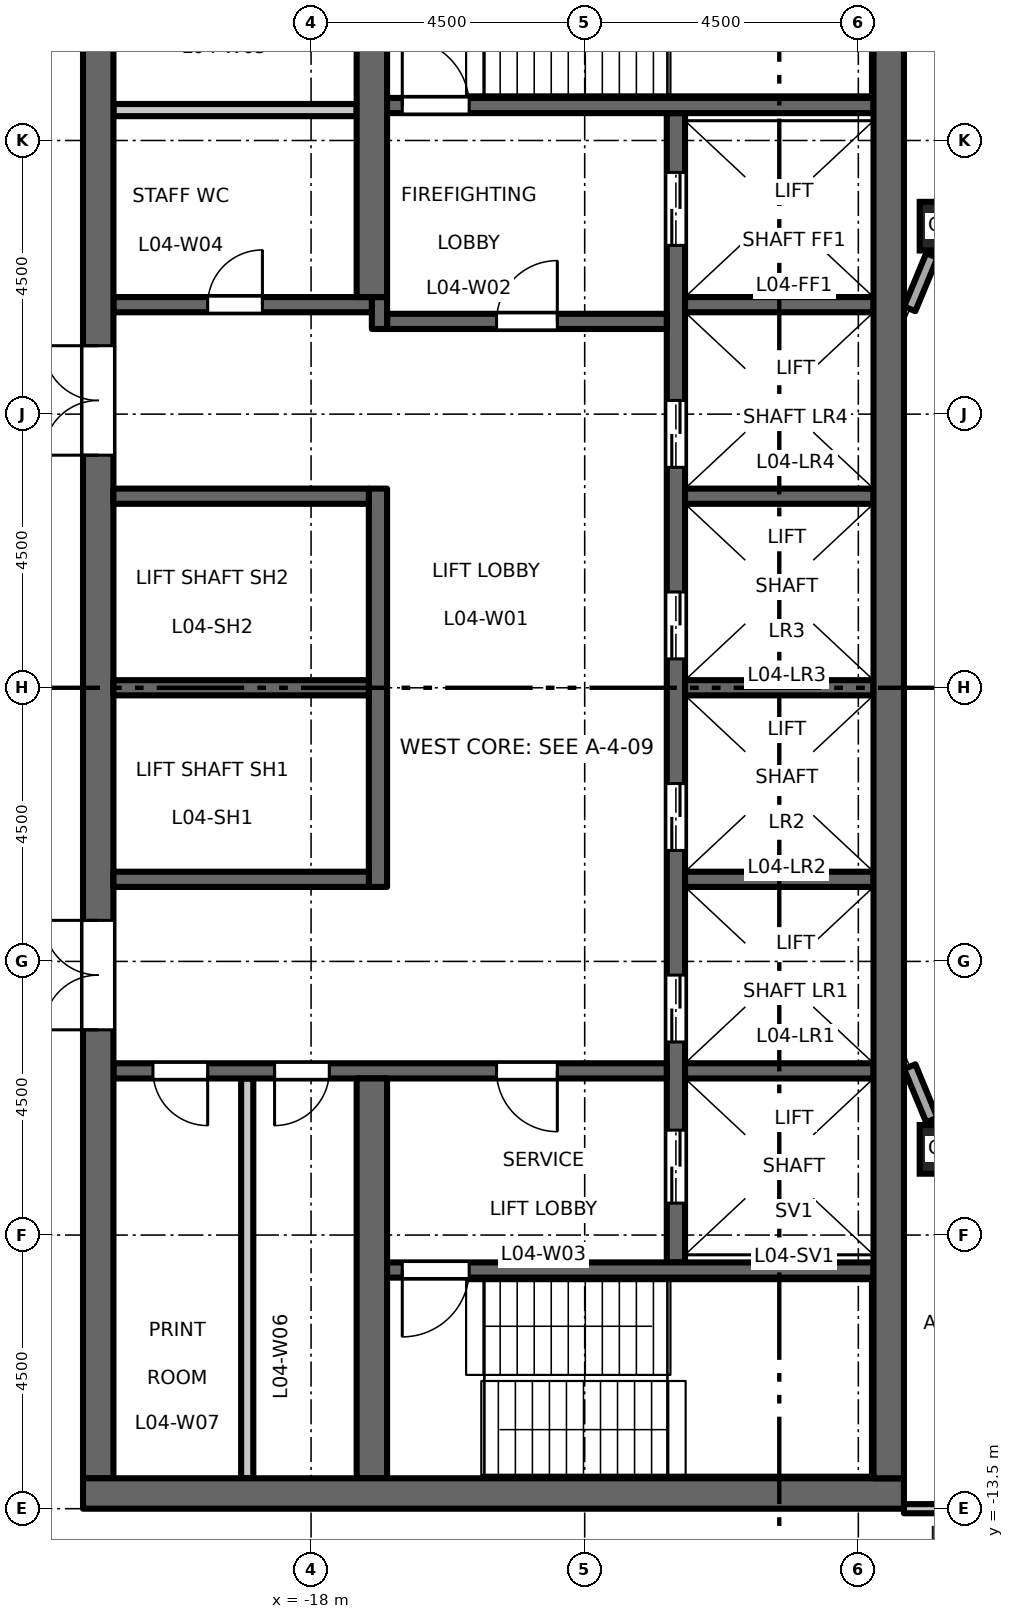
"""IFC4 building model, lengths in metres.
Left out: names, types, materials, properties, quantities, classifications, styles, units other than length and angle.
Written with IfcOpenShell. Run it as: python <this file> out.ifc"""

import sys

from ifc_helpers import new_model, si_unit, direction, frame, frame_2d, origin, origin_2d, place, context, subcontext, project, spatial, rectangle, hollow_rectangle, extrude, element, fill, save


model = new_model("IFC4")
c1 = context("Model", 3, precision=1e-05, world=origin(), true_north=direction((0.0, 1.0)))
c2 = subcontext(c1, "Body", "Model", "MODEL_VIEW")
j1 = project(units=[si_unit("LENGTHUNIT", "METRE"), si_unit("PLANEANGLEUNIT", "RADIAN")], contexts=[c1])
p1 = place(None, origin())
s1 = spatial("IfcSite", under=j1, at=p1, CompositionType="ELEMENT")
p2 = place(p1, origin())
s2 = spatial("IfcBuilding", under=s1, at=p2, CompositionType="ELEMENT")
p3 = place(p2, frame((0.0, 0.0, 22.2)))
s3 = spatial("IfcBuildingStorey", under=s2, at=p3, CompositionType="ELEMENT", Elevation=22.2)
for number, where, z_axis, x_axis in (
    (1, (-7.591, -7.591, 0.0), (0.0, 0.0, 1.0), (1.0, 0.0, 0.0)),
    (2, (-7.591, 7.591, 0.0), (0.0, 0.0, 1.0), (1.0, 0.0, 0.0)),
):
    element("IfcColumn", number, at=place(p3, frame(where, z_axis=z_axis, x_axis=x_axis)), inside=s3, PredefinedType="COLUMN", context=c2, shape_type="SweptSolid", body=[
        extrude(hollow_rectangle(XDim=0.8, YDim=0.8, WallThickness=0.05, at=origin_2d()), origin(), (0.0, 0.0, 1.0), 4.5),
    ])
p4 = place(p3, frame((-12.0, -9.45, 0.0), z_axis=(0.0, 0.0, 1.0), x_axis=(0.0, 1.0, 0.0)))
e3 = element("IfcWall", 3, at=p4, inside=s3, PredefinedType="SHEAR", context=c2, shape_type="SweptSolid", body=[
    extrude(rectangle(XDim=18.9, YDim=0.3, at=frame_2d((9.45, 0.0))), origin(), (0.0, 0.0, 1.0), 4.35),
])
p5 = place(p4, frame((3.625, 0.0, 0.0)))
e4 = element("IfcOpeningElement", 4, at=p5, cuts=e3, PredefinedType="OPENING", context=c2, shape_type="SweptSolid", body=[
    extrude(rectangle(XDim=1.1, YDim=2.1, at=frame_2d((0.55, 1.05))), frame((0.0, 0.16, 0.0), z_axis=(0.0, -1.0, 0.0), x_axis=(1.0, 0.0, 0.0)), (0.0, 0.0, 1.0), 0.32),
])
p6 = place(p4, frame((6.775, 0.0, 0.0)))
e5 = element("IfcOpeningElement", 5, at=p6, cuts=e3, PredefinedType="OPENING", context=c2, shape_type="SweptSolid", body=[
    extrude(rectangle(XDim=1.1, YDim=2.1, at=frame_2d((0.55, 1.05))), frame((0.0, 0.16, 0.0), z_axis=(0.0, -1.0, 0.0), x_axis=(1.0, 0.0, 0.0)), (0.0, 0.0, 1.0), 0.32),
])
p7 = place(p4, frame((9.925, 0.0, 0.0)))
e6 = element("IfcOpeningElement", 6, at=p7, cuts=e3, PredefinedType="OPENING", context=c2, shape_type="SweptSolid", body=[
    extrude(rectangle(XDim=1.1, YDim=2.1, at=frame_2d((0.55, 1.05))), frame((0.0, 0.16, 0.0), z_axis=(0.0, -1.0, 0.0), x_axis=(1.0, 0.0, 0.0)), (0.0, 0.0, 1.0), 0.32),
])
p8 = place(p4, frame((13.075, 0.0, 0.0)))
e7 = element("IfcOpeningElement", 7, at=p8, cuts=e3, PredefinedType="OPENING", context=c2, shape_type="SweptSolid", body=[
    extrude(rectangle(XDim=1.1, YDim=2.1, at=frame_2d((0.55, 1.05))), frame((0.0, 0.16, 0.0), z_axis=(0.0, -1.0, 0.0), x_axis=(1.0, 0.0, 0.0)), (0.0, 0.0, 1.0), 0.32),
])
p9 = place(p4, frame((16.725, 0.0, 0.0)))
e8 = element("IfcOpeningElement", 8, at=p9, cuts=e3, PredefinedType="OPENING", context=c2, shape_type="SweptSolid", body=[
    extrude(rectangle(XDim=1.2, YDim=2.1, at=frame_2d((0.6, 1.05))), frame((0.0, 0.16, 0.0), z_axis=(0.0, -1.0, 0.0), x_axis=(1.0, 0.0, 0.0)), (0.0, 0.0, 1.0), 0.32),
])
p10 = place(p4, frame((0.975, 0.0, 0.0)))
e9 = element("IfcOpeningElement", 9, at=p10, cuts=e3, PredefinedType="OPENING", context=c2, shape_type="SweptSolid", body=[
    extrude(rectangle(XDim=1.2, YDim=2.1, at=frame_2d((0.6, 1.05))), frame((0.0, 0.16, 0.0), z_axis=(0.0, -1.0, 0.0), x_axis=(1.0, 0.0, 0.0)), (0.0, 0.0, 1.0), 0.32),
])
p11 = place(p3, frame((-12.15, 6.025, 0.0), z_axis=(0.0, 0.0, 1.0), x_axis=(-1.0, 0.0, 0.0)))
e10 = element("IfcWall", 10, at=p11, inside=s3, PredefinedType="SHEAR", context=c2, shape_type="SweptSolid", body=[
    extrude(rectangle(XDim=4.6, YDim=0.25, at=frame_2d((2.3, 0.0))), origin(), (0.0, 0.0, 1.0), 4.35),
])
p12 = place(p11, frame((1.8, 0.0, 0.0)))
e11 = element("IfcOpeningElement", 11, at=p12, cuts=e10, PredefinedType="OPENING", context=c2, shape_type="SweptSolid", body=[
    extrude(rectangle(XDim=1.0, YDim=2.1, at=frame_2d((0.5, 1.05))), frame((0.0, 0.135, 0.0), z_axis=(0.0, -1.0, 0.0), x_axis=(1.0, 0.0, 0.0)), (0.0, 0.0, 1.0), 0.27),
])
p13 = place(p3, frame((-16.875, 5.9, 0.0), z_axis=(0.0, 0.0, 1.0), x_axis=(0.0, 1.0, 0.0)))
e12 = element("IfcWall", 12, at=p13, inside=s3, PredefinedType="SHEAR", context=c2, shape_type="SweptSolid", body=[
    extrude(rectangle(XDim=0.525, YDim=0.25, at=frame_2d((0.263, 0.0))), origin(), (0.0, 0.0, 1.0), 4.35),
])
p14 = place(p3, frame((-17.0, 6.3, 0.0), z_axis=(0.0, 0.0, 1.0), x_axis=(-1.0, 0.0, 0.0)))
e13 = element("IfcWall", 13, at=p14, inside=s3, PredefinedType="SHEAR", context=c2, shape_type="SweptSolid", body=[
    extrude(rectangle(XDim=4.25, YDim=0.25, at=frame_2d((2.125, 0.0))), origin(), (0.0, 0.0, 1.0), 4.35),
])
p15 = place(p14, frame((1.8, 0.0, 0.0)))
e14 = element("IfcOpeningElement", 14, at=p15, cuts=e13, PredefinedType="OPENING", context=c2, shape_type="SweptSolid", body=[
    extrude(rectangle(XDim=0.9, YDim=2.1, at=frame_2d((0.45, 1.05))), frame((0.0, 0.135, 0.0), z_axis=(0.0, -1.0, 0.0), x_axis=(1.0, 0.0, 0.0)), (0.0, 0.0, 1.0), 0.27),
])
p16 = place(p3, frame((-12.15, -6.3, 0.0), z_axis=(0.0, 0.0, 1.0), x_axis=(-1.0, 0.0, 0.0)))
e15 = element("IfcWall", 15, at=p16, inside=s3, PredefinedType="SHEAR", context=c2, shape_type="SweptSolid", body=[
    extrude(rectangle(XDim=9.1, YDim=0.25, at=frame_2d((4.55, 0.0))), origin(), (0.0, 0.0, 1.0), 4.35),
])
p17 = place(p16, frame((1.8, 0.0, 0.0)))
e16 = element("IfcOpeningElement", 16, at=p17, cuts=e15, PredefinedType="OPENING", context=c2, shape_type="SweptSolid", body=[
    extrude(rectangle(XDim=1.0, YDim=2.1, at=frame_2d((0.5, 1.05))), frame((0.0, 0.135, 0.0), z_axis=(0.0, -1.0, 0.0), x_axis=(1.0, 0.0, 0.0)), (0.0, 0.0, 1.0), 0.27),
])
p18 = place(p16, frame((5.55, 0.0, 0.0)))
e17 = element("IfcOpeningElement", 17, at=p18, cuts=e15, PredefinedType="OPENING", context=c2, shape_type="SweptSolid", body=[
    extrude(rectangle(XDim=0.9, YDim=2.1, at=frame_2d((0.45, 1.05))), frame((0.0, 0.135, 0.0), z_axis=(0.0, -1.0, 0.0), x_axis=(1.0, 0.0, 0.0)), (0.0, 0.0, 1.0), 0.27),
])
p19 = place(p16, frame((7.55, 0.0, 0.0)))
e18 = element("IfcOpeningElement", 18, at=p19, cuts=e15, PredefinedType="OPENING", context=c2, shape_type="SweptSolid", body=[
    extrude(rectangle(XDim=0.9, YDim=2.1, at=frame_2d((0.45, 1.05))), frame((0.0, 0.135, 0.0), z_axis=(0.0, -1.0, 0.0), x_axis=(1.0, 0.0, 0.0)), (0.0, 0.0, 1.0), 0.27),
])
p20 = place(p3, frame((-21.5, -13.0, 0.0), z_axis=(0.0, 0.0, 1.0), x_axis=(0.0, 1.0, 0.0)))
e19 = element("IfcWall", 19, at=p20, inside=s3, PredefinedType="SHEAR", context=c2, shape_type="SweptSolid", body=[
    extrude(rectangle(XDim=26.0, YDim=0.5, at=frame_2d((13.0, 0.0))), origin(), (0.0, 0.0, 1.0), 4.35),
])
p21 = place(p20, frame((16.825, 0.0, 0.0)))
e20 = element("IfcOpeningElement", 20, at=p21, cuts=e19, PredefinedType="OPENING", context=c2, shape_type="SweptSolid", body=[
    extrude(rectangle(XDim=1.8, YDim=2.1, at=frame_2d((0.9, 1.05))), frame((0.0, 0.26, 0.0), z_axis=(0.0, -1.0, 0.0), x_axis=(1.0, 0.0, 0.0)), (0.0, 0.0, 1.0), 0.52),
])
p22 = place(p20, frame((7.375, 0.0, 0.0)))
e21 = element("IfcOpeningElement", 21, at=p22, cuts=e19, PredefinedType="OPENING", context=c2, shape_type="SweptSolid", body=[
    extrude(rectangle(XDim=1.8, YDim=2.1, at=frame_2d((0.9, 1.05))), frame((0.0, 0.26, 0.0), z_axis=(0.0, -1.0, 0.0), x_axis=(1.0, 0.0, 0.0)), (0.0, 0.0, 1.0), 0.52),
])
p23 = place(p20, frame((23.8, 0.0, 0.0)))
e22 = element("IfcOpeningElement", 22, at=p23, cuts=e19, PredefinedType="OPENING", context=c2, shape_type="SweptSolid", body=[
    extrude(rectangle(XDim=0.9, YDim=2.1, at=frame_2d((0.45, 1.05))), frame((0.0, 0.26, 0.0), z_axis=(0.0, -1.0, 0.0), x_axis=(1.0, 0.0, 0.0)), (0.0, 0.0, 1.0), 0.52),
])
p24 = place(p3, frame((-17.25, 9.5, 0.0), z_axis=(0.0, 0.0, 1.0), x_axis=(-1.0, 0.0, 0.0)))
e23 = element("IfcWall", 23, at=p24, inside=s3, PredefinedType="PARTITIONING", context=c2, shape_type="SweptSolid", body=[
    extrude(rectangle(XDim=4.0, YDim=0.2, at=frame_2d((2.0, 0.0))), origin(), (0.0, 0.0, 1.0), 4.35),
])
p25 = place(p3, frame((-19.05, -13.0, 0.0), z_axis=(0.0, 0.0, 1.0), x_axis=(0.0, 1.0, 0.0)))
e24 = element("IfcWall", 24, at=p25, inside=s3, PredefinedType="PARTITIONING", context=c2, shape_type="SweptSolid", body=[
    extrude(rectangle(XDim=6.575, YDim=0.2, at=frame_2d((3.288, 0.0))), origin(), (0.0, 0.0, 1.0), 4.35),
])
p26 = place(p3, frame((-16.9, -3.275, 0.0), z_axis=(0.0, 0.0, 1.0), x_axis=(0.0, 1.0, 0.0)))
e25 = element("IfcWall", 25, at=p26, inside=s3, PredefinedType="SHEAR", context=c2, shape_type="SweptSolid", body=[
    extrude(rectangle(XDim=6.55, YDim=0.3, at=frame_2d((3.275, 0.0))), origin(), (0.0, 0.0, 1.0), 4.35),
])
for number, where, z_axis, x_axis in (
    (26, (-17.05, 0.0, 0.0), (0.0, 0.0, 1.0), (-1.0, 0.0, 0.0)),
    (27, (-17.05, 3.15, 0.0), (0.0, 0.0, 1.0), (-1.0, 0.0, 0.0)),
    (28, (-17.05, -3.15, 0.0), (0.0, 0.0, 1.0), (-1.0, 0.0, 0.0)),
):
    element("IfcWall", number, at=place(p3, frame(where, z_axis=z_axis, x_axis=x_axis)), inside=s3, PredefinedType="SHEAR", context=c2, shape_type="SweptSolid", body=[
        extrude(rectangle(XDim=4.2, YDim=0.25, at=frame_2d((2.1, 0.0))), origin(), (0.0, 0.0, 1.0), 4.35),
    ])
for number, where, z_axis, x_axis in (
    (29, (-17.0, 6.425, 0.0), (0.0, 0.0, 1.0), (0.0, 1.0, 0.0)),
    (30, (-17.0, -13.0, 0.0), (0.0, 0.0, 1.0), (0.0, 1.0, 0.0)),
):
    element("IfcWall", number, at=place(p3, frame(where, z_axis=z_axis, x_axis=x_axis)), inside=s3, PredefinedType="SHEAR", context=c2, shape_type="SweptSolid", body=[
        extrude(rectangle(XDim=6.575, YDim=0.5, at=frame_2d((3.288, 0.0))), origin(), (0.0, 0.0, 1.0), 4.35),
    ])
for number, where, z_axis, x_axis in (
    (31, (-8.75, 0.0, 0.0), (0.0, 0.0, 1.0), (-1.0, 0.0, 0.0)),
    (32, (-8.75, 3.15, 0.0), (0.0, 0.0, 1.0), (-1.0, 0.0, 0.0)),
    (33, (-8.75, 6.3, 0.0), (0.0, 0.0, 1.0), (-1.0, 0.0, 0.0)),
    (34, (-8.75, -3.15, 0.0), (0.0, 0.0, 1.0), (-1.0, 0.0, 0.0)),
    (35, (-8.75, -6.3, 0.0), (0.0, 0.0, 1.0), (-1.0, 0.0, 0.0)),
):
    element("IfcWall", number, at=place(p3, frame(where, z_axis=z_axis, x_axis=x_axis)), inside=s3, PredefinedType="SHEAR", context=c2, shape_type="SweptSolid", body=[
        extrude(rectangle(XDim=3.1, YDim=0.25, at=frame_2d((1.55, 0.0))), origin(), (0.0, 0.0, 1.0), 4.35),
    ])
p27 = place(p3, frame((-8.75, 9.575, 0.0), z_axis=(0.0, 0.0, 1.0), x_axis=(-1.0, 0.0, 0.0)))
e36 = element("IfcWall", 36, at=p27, inside=s3, PredefinedType="SHEAR", context=c2, shape_type="SweptSolid", body=[
    extrude(rectangle(XDim=8.0, YDim=0.25, at=frame_2d((4.0, 0.0))), origin(), (0.0, 0.0, 1.0), 4.35),
])
p28 = place(p27, frame((6.65, 0.0, 0.0)))
e37 = element("IfcOpeningElement", 37, at=p28, cuts=e36, PredefinedType="OPENING", context=c2, shape_type="SweptSolid", body=[
    extrude(rectangle(XDim=1.1, YDim=2.1, at=frame_2d((0.55, 1.05))), frame((0.0, 0.135, 0.0), z_axis=(0.0, -1.0, 0.0), x_axis=(1.0, 0.0, 0.0)), (0.0, 0.0, 1.0), 0.27),
])
p29 = place(p3, frame((-8.75, -9.575, 0.0), z_axis=(0.0, 0.0, 1.0), x_axis=(-1.0, 0.0, 0.0)))
e38 = element("IfcWall", 38, at=p29, inside=s3, PredefinedType="SHEAR", context=c2, shape_type="SweptSolid", body=[
    extrude(rectangle(XDim=8.0, YDim=0.25, at=frame_2d((4.0, 0.0))), origin(), (0.0, 0.0, 1.0), 4.35),
])
p30 = place(p29, frame((6.65, 0.0, 0.0)))
e39 = element("IfcOpeningElement", 39, at=p30, cuts=e38, PredefinedType="OPENING", context=c2, shape_type="SweptSolid", body=[
    extrude(rectangle(XDim=1.1, YDim=2.1, at=frame_2d((0.55, 1.05))), frame((0.0, 0.135, 0.0), z_axis=(0.0, -1.0, 0.0), x_axis=(1.0, 0.0, 0.0)), (0.0, 0.0, 1.0), 0.27),
])
p31 = place(p3, frame((-8.25, -13.25, 0.0), z_axis=(0.0, 0.0, 1.0), x_axis=(-1.0, 0.0, 0.0)))
e40 = element("IfcWall", 40, at=p31, inside=s3, PredefinedType="SHEAR", context=c2, shape_type="SweptSolid", body=[
    extrude(rectangle(XDim=13.5, YDim=0.5, at=frame_2d((6.75, 0.0))), origin(), (0.0, 0.0, 1.0), 4.35),
])
p32 = place(p3, frame((-8.5, -13.0, 0.0), z_axis=(0.0, 0.0, 1.0), x_axis=(0.0, 1.0, 0.0)))
e41 = element("IfcWall", 41, at=p32, inside=s3, PredefinedType="SHEAR", context=c2, shape_type="SweptSolid", body=[
    extrude(rectangle(XDim=26.0, YDim=0.5, at=frame_2d((13.0, 0.0))), origin(), (0.0, 0.0, 1.0), 4.35),
])
for number, where, z_axis, x_axis in (
    (42, (-7.791, 7.108, 0.0), (0.0, 0.0, 1.0), (-0.383, -0.924, 0.0)),
    (43, (-8.154, -6.231, 0.0), (0.0, 0.0, 1.0), (0.383, -0.924, 0.0)),
):
    element("IfcWall", number, at=place(p3, frame(where, z_axis=z_axis, x_axis=x_axis)), inside=s3, PredefinedType="STANDARD", context=c2, shape_type="SweptSolid", body=[
        extrude(rectangle(XDim=0.949, YDim=0.2, at=frame_2d((0.475, 0.0))), origin(), (0.0, 0.0, 1.0), 3.73),
    ])
p33 = place(p3, frame((-8.25, -13.5, 0.0), z_axis=(0.0, 0.0, 1.0), x_axis=(1.0, 0.0, 0.0)))
e44 = element("IfcWall", 44, at=p33, inside=s3, PredefinedType="PARTITIONING", context=c2, shape_type="SweptSolid", body=[
    extrude(rectangle(XDim=16.5, YDim=0.15, at=frame_2d((8.25, 0.0))), origin(), (0.0, 0.0, 1.0), 3.85),
])
p34 = place(p33, frame((0.6, 0.0, 0.0)))
e45 = element("IfcOpeningElement", 45, at=p34, cuts=e44, PredefinedType="OPENING", context=c2, shape_type="SweptSolid", body=[
    extrude(rectangle(XDim=1.0, YDim=2.1, at=frame_2d((0.5, 1.05))), frame((0.0, 0.085, 0.0), z_axis=(0.0, -1.0, 0.0), x_axis=(1.0, 0.0, 0.0)), (0.0, 0.0, 1.0), 0.17),
])
p35 = place(p33, frame((8.85, 0.0, 0.0)))
e46 = element("IfcOpeningElement", 46, at=p35, cuts=e44, PredefinedType="OPENING", context=c2, shape_type="SweptSolid", body=[
    extrude(rectangle(XDim=1.0, YDim=2.1, at=frame_2d((0.5, 1.05))), frame((0.0, 0.085, 0.0), z_axis=(0.0, -1.0, 0.0), x_axis=(1.0, 0.0, 0.0)), (0.0, 0.0, 1.0), 0.17),
])
p36 = place(p12, origin())
e47 = element("IfcDoor", 47, at=p36, inside=s3, OperationType="SINGLE_SWING_LEFT", PredefinedType="DOOR", context=c2, shape_type="SweptSolid", body=[
    extrude(rectangle(XDim=1.0, YDim=2.1, at=frame_2d((0.5, 1.05))), frame((0.0, 0.025, 0.0), z_axis=(0.0, -1.0, 0.0), x_axis=(1.0, 0.0, 0.0)), (0.0, 0.0, 1.0), 0.05),
])
fill(e11, e47)
p37 = place(p17, origin())
e48 = element("IfcDoor", 48, at=p37, inside=s3, OperationType="SINGLE_SWING_RIGHT", PredefinedType="DOOR", context=c2, shape_type="SweptSolid", body=[
    extrude(rectangle(XDim=1.0, YDim=2.1, at=frame_2d((0.5, 1.05))), frame((0.0, 0.025, 0.0), z_axis=(0.0, -1.0, 0.0), x_axis=(1.0, 0.0, 0.0)), (0.0, 0.0, 1.0), 0.05),
])
fill(e16, e48)
p38 = place(p28, origin())
e49 = element("IfcDoor", 49, at=p38, inside=s3, OperationType="SINGLE_SWING_RIGHT", PredefinedType="DOOR", context=c2, shape_type="SweptSolid", body=[
    extrude(rectangle(XDim=1.1, YDim=2.1, at=frame_2d((0.55, 1.05))), frame((0.0, 0.025, 0.0), z_axis=(0.0, -1.0, 0.0), x_axis=(1.0, 0.0, 0.0)), (0.0, 0.0, 1.0), 0.05),
])
fill(e37, e49)
p39 = place(p30, origin())
e50 = element("IfcDoor", 50, at=p39, inside=s3, OperationType="SINGLE_SWING_LEFT", PredefinedType="DOOR", context=c2, shape_type="SweptSolid", body=[
    extrude(rectangle(XDim=1.1, YDim=2.1, at=frame_2d((0.55, 1.05))), frame((0.0, 0.025, 0.0), z_axis=(0.0, -1.0, 0.0), x_axis=(1.0, 0.0, 0.0)), (0.0, 0.0, 1.0), 0.05),
])
fill(e39, e50)
p40 = place(p21, origin())
e51 = element("IfcDoor", 51, at=p40, inside=s3, OperationType="DOUBLE_DOOR_DOUBLE_SWING", PredefinedType="DOOR", context=c2, shape_type="SweptSolid", body=[
    extrude(rectangle(XDim=1.8, YDim=2.1, at=frame_2d((0.9, 1.05))), frame((0.0, 0.025, 0.0), z_axis=(0.0, -1.0, 0.0), x_axis=(1.0, 0.0, 0.0)), (0.0, 0.0, 1.0), 0.05),
])
fill(e20, e51)
p41 = place(p22, origin())
e52 = element("IfcDoor", 52, at=p41, inside=s3, OperationType="DOUBLE_DOOR_DOUBLE_SWING", PredefinedType="DOOR", context=c2, shape_type="SweptSolid", body=[
    extrude(rectangle(XDim=1.8, YDim=2.1, at=frame_2d((0.9, 1.05))), frame((0.0, 0.025, 0.0), z_axis=(0.0, -1.0, 0.0), x_axis=(1.0, 0.0, 0.0)), (0.0, 0.0, 1.0), 0.05),
])
fill(e21, e52)
p42 = place(p5, origin())
e53 = element("IfcDoor", 53, at=p42, inside=s3, OperationType="DOUBLE_DOOR_SLIDING", PredefinedType="DOOR", context=c2, shape_type="SweptSolid", body=[
    extrude(rectangle(XDim=1.1, YDim=2.1, at=frame_2d((0.55, 1.05))), frame((0.0, 0.025, 0.0), z_axis=(0.0, -1.0, 0.0), x_axis=(1.0, 0.0, 0.0)), (0.0, 0.0, 1.0), 0.05),
])
fill(e4, e53)
p43 = place(p6, origin())
e54 = element("IfcDoor", 54, at=p43, inside=s3, OperationType="DOUBLE_DOOR_SLIDING", PredefinedType="DOOR", context=c2, shape_type="SweptSolid", body=[
    extrude(rectangle(XDim=1.1, YDim=2.1, at=frame_2d((0.55, 1.05))), frame((0.0, 0.025, 0.0), z_axis=(0.0, -1.0, 0.0), x_axis=(1.0, 0.0, 0.0)), (0.0, 0.0, 1.0), 0.05),
])
fill(e5, e54)
p44 = place(p7, origin())
e55 = element("IfcDoor", 55, at=p44, inside=s3, OperationType="DOUBLE_DOOR_SLIDING", PredefinedType="DOOR", context=c2, shape_type="SweptSolid", body=[
    extrude(rectangle(XDim=1.1, YDim=2.1, at=frame_2d((0.55, 1.05))), frame((0.0, 0.025, 0.0), z_axis=(0.0, -1.0, 0.0), x_axis=(1.0, 0.0, 0.0)), (0.0, 0.0, 1.0), 0.05),
])
fill(e6, e55)
p45 = place(p8, origin())
e56 = element("IfcDoor", 56, at=p45, inside=s3, OperationType="DOUBLE_DOOR_SLIDING", PredefinedType="DOOR", context=c2, shape_type="SweptSolid", body=[
    extrude(rectangle(XDim=1.1, YDim=2.1, at=frame_2d((0.55, 1.05))), frame((0.0, 0.025, 0.0), z_axis=(0.0, -1.0, 0.0), x_axis=(1.0, 0.0, 0.0)), (0.0, 0.0, 1.0), 0.05),
])
fill(e7, e56)
p46 = place(p9, origin())
e57 = element("IfcDoor", 57, at=p46, inside=s3, OperationType="DOUBLE_DOOR_SLIDING", PredefinedType="DOOR", context=c2, shape_type="SweptSolid", body=[
    extrude(rectangle(XDim=1.2, YDim=2.1, at=frame_2d((0.6, 1.05))), frame((0.0, 0.025, 0.0), z_axis=(0.0, -1.0, 0.0), x_axis=(1.0, 0.0, 0.0)), (0.0, 0.0, 1.0), 0.05),
])
fill(e8, e57)
p47 = place(p10, origin())
e58 = element("IfcDoor", 58, at=p47, inside=s3, OperationType="DOUBLE_DOOR_SLIDING", PredefinedType="DOOR", context=c2, shape_type="SweptSolid", body=[
    extrude(rectangle(XDim=1.2, YDim=2.1, at=frame_2d((0.6, 1.05))), frame((0.0, 0.025, 0.0), z_axis=(0.0, -1.0, 0.0), x_axis=(1.0, 0.0, 0.0)), (0.0, 0.0, 1.0), 0.05),
])
fill(e9, e58)
p48 = place(p15, origin())
e59 = element("IfcDoor", 59, at=p48, inside=s3, OperationType="SINGLE_SWING_LEFT", PredefinedType="DOOR", context=c2, shape_type="SweptSolid", body=[
    extrude(rectangle(XDim=0.9, YDim=2.1, at=frame_2d((0.45, 1.05))), frame((0.0, 0.025, 0.0), z_axis=(0.0, -1.0, 0.0), x_axis=(1.0, 0.0, 0.0)), (0.0, 0.0, 1.0), 0.05),
])
fill(e14, e59)
p49 = place(p18, origin())
e60 = element("IfcDoor", 60, at=p49, inside=s3, OperationType="SINGLE_SWING_LEFT", PredefinedType="DOOR", context=c2, shape_type="SweptSolid", body=[
    extrude(rectangle(XDim=0.9, YDim=2.1, at=frame_2d((0.45, 1.05))), frame((0.0, 0.025, 0.0), z_axis=(0.0, -1.0, 0.0), x_axis=(1.0, 0.0, 0.0)), (0.0, 0.0, 1.0), 0.05),
])
fill(e17, e60)
p50 = place(p19, origin())
e61 = element("IfcDoor", 61, at=p50, inside=s3, OperationType="SINGLE_SWING_RIGHT", PredefinedType="DOOR", context=c2, shape_type="SweptSolid", body=[
    extrude(rectangle(XDim=0.9, YDim=2.1, at=frame_2d((0.45, 1.05))), frame((0.0, 0.025, 0.0), z_axis=(0.0, -1.0, 0.0), x_axis=(1.0, 0.0, 0.0)), (0.0, 0.0, 1.0), 0.05),
])
fill(e18, e61)
save(model, sys.argv[1])
